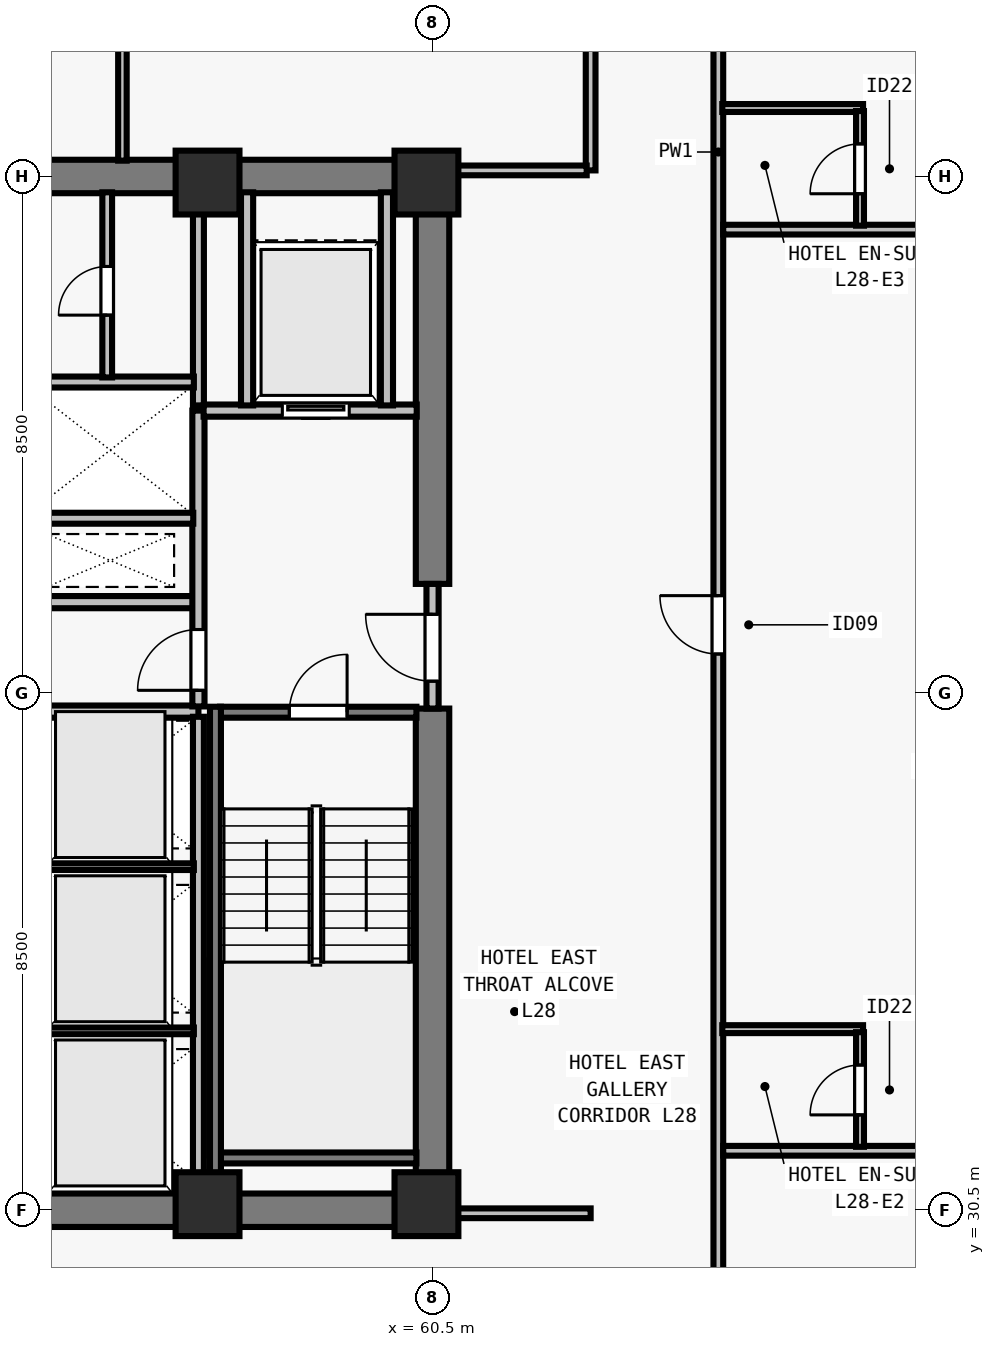
"""IFC4 building model, lengths in metres.
Left out: names, types, materials, properties, quantities, classifications, styles, units other than length and angle.
Written with IfcOpenShell. Run it as: python <this file> out.ifc"""

import sys

from ifc_helpers import new_model, si_unit, direction, frame, frame_2d, origin, origin_2d, place, context, subcontext, project, spatial, rectangle, extrude, element, fill, save


model = new_model("IFC4")
c1 = context("Model", 3, precision=1e-05, world=origin(), true_north=direction((0.0, 1.0)))
c2 = subcontext(c1, "Body", "Model", "MODEL_VIEW")
j1 = project(units=[si_unit("LENGTHUNIT", "METRE"), si_unit("PLANEANGLEUNIT", "RADIAN")], contexts=[c1])
p1 = place(None, origin())
s1 = spatial("IfcSite", under=j1, at=p1, CompositionType="ELEMENT")
p2 = place(p1, origin())
s2 = spatial("IfcBuilding", under=s1, at=p2, CompositionType="ELEMENT")
p3 = place(p2, frame((0.0, 0.0, 106.0)))
s3 = spatial("IfcBuildingStorey", under=s2, at=p3, CompositionType="ELEMENT", Elevation=106.0)
for number, where, z_axis, x_axis in (
    (1, (56.8, 30.6, 0.0), (0.0, 0.0, 1.0), (1.0, 0.0, 0.0)),
    (2, (60.4, 30.6, 0.0), (0.0, 0.0, 1.0), (1.0, 0.0, 0.0)),
    (3, (56.8, 47.4, 0.0), (0.0, 0.0, 1.0), (1.0, 0.0, 0.0)),
    (4, (60.4, 47.4, 0.0), (0.0, 0.0, 1.0), (1.0, 0.0, 0.0)),
):
    element("IfcColumn", number, at=place(p3, frame(where, z_axis=z_axis, x_axis=x_axis)), inside=s3, PredefinedType="COLUMN", context=c2, shape_type="SweptSolid", body=[
        extrude(rectangle(XDim=1.05, YDim=1.05, at=origin_2d()), origin(), (0.0, 0.0, 1.0), 3.5),
    ])
for number, where, z_axis, x_axis in (
    (5, (43.225, 30.5, 0.0), (0.0, 0.0, 1.0), (1.0, 0.0, 0.0)),
    (6, (43.225, 47.5, 0.0), (0.0, 0.0, 1.0), (1.0, 0.0, 0.0)),
):
    element("IfcWall", number, at=place(p3, frame(where, z_axis=z_axis, x_axis=x_axis)), inside=s3, PredefinedType="SHEAR", context=c2, shape_type="SweptSolid", body=[
        extrude(rectangle(XDim=17.55, YDim=0.55, at=frame_2d((8.775, 0.0))), origin(), (0.0, 0.0, 1.0), 3.28),
    ])
p4 = place(p3, frame((60.5, 30.765, 0.0), z_axis=(0.0, 0.0, 1.0), x_axis=(0.0, 1.0, 0.0)))
e7 = element("IfcWall", 7, at=p4, inside=s3, PredefinedType="SHEAR", context=c2, shape_type="SweptSolid", body=[
    extrude(rectangle(XDim=7.985, YDim=0.55, at=frame_2d((3.993, 0.0))), origin(), (0.0, 0.0, 1.0), 3.28),
])
p5 = place(p3, frame((60.5, 40.8, 0.0), z_axis=(0.0, 0.0, 1.0), x_axis=(0.0, 1.0, 0.0)))
e8 = element("IfcWall", 8, at=p5, inside=s3, PredefinedType="SHEAR", context=c2, shape_type="SweptSolid", body=[
    extrude(rectangle(XDim=6.435, YDim=0.55, at=frame_2d((3.218, 0.0))), origin(), (0.0, 0.0, 1.0), 3.28),
])
for number, where, z_axis, x_axis in (
    (9, (53.7, 38.7, 0.0), (0.0, 0.0, 1.0), (1.0, 0.0, 0.0)),
    (10, (53.7, 40.5, 0.0), (0.0, 0.0, 1.0), (1.0, 0.0, 0.0)),
):
    element("IfcWall", number, at=place(p3, frame(where, z_axis=z_axis, x_axis=x_axis)), inside=s3, PredefinedType="SOLIDWALL", context=c2, shape_type="SweptSolid", body=[
        extrude(rectangle(XDim=2.95, YDim=0.2, at=frame_2d((1.475, 0.0))), origin(), (0.0, 0.0, 1.0), 3.28),
    ])
p6 = place(p3, frame((60.5, 38.75, 0.0), z_axis=(0.0, 0.0, 1.0), x_axis=(0.0, 1.0, 0.0)))
e11 = element("IfcWall", 11, at=p6, inside=s3, PredefinedType="SOLIDWALL", context=c2, shape_type="SweptSolid", body=[
    extrude(rectangle(XDim=2.05, YDim=0.2, at=frame_2d((1.025, 0.0))), origin(), (0.0, 0.0, 1.0), 3.28),
])
p7 = place(p6, frame((0.45, 0.0, 0.0)))
e12 = element("IfcOpeningElement", 12, at=p7, cuts=e11, PredefinedType="OPENING", context=c2, shape_type="SweptSolid", body=[
    extrude(rectangle(XDim=1.1, YDim=2.15, at=frame_2d((0.55, 1.075))), frame((0.0, 0.11, 0.0), z_axis=(0.0, -1.0, 0.0), x_axis=(1.0, 0.0, 0.0)), (0.0, 0.0, 1.0), 0.22),
])
p8 = place(p3, frame((56.65, 38.785, 0.0), z_axis=(0.0, 0.0, 1.0), x_axis=(0.0, 1.0, 0.0)))
e13 = element("IfcWall", 13, at=p8, inside=s3, PredefinedType="SOLIDWALL", context=c2, shape_type="SweptSolid", body=[
    extrude(rectangle(XDim=4.865, YDim=0.2, at=frame_2d((2.433, 0.0))), origin(), (0.0, 0.0, 1.0), 3.28),
])
p9 = place(p8, frame((0.265, 0.0, 0.0)))
e14 = element("IfcOpeningElement", 14, at=p9, cuts=e13, PredefinedType="OPENING", context=c2, shape_type="SweptSolid", body=[
    extrude(rectangle(XDim=1.0, YDim=2.15, at=frame_2d((0.5, 1.075))), frame((0.0, 0.11, 0.0), z_axis=(0.0, -1.0, 0.0), x_axis=(1.0, 0.0, 0.0)), (0.0, 0.0, 1.0), 0.22),
])
p10 = place(p3, frame((56.735, 43.65, 0.0), z_axis=(0.0, 0.0, 1.0), x_axis=(1.0, 0.0, 0.0)))
e15 = element("IfcWall", 15, at=p10, inside=s3, PredefinedType="SOLIDWALL", context=c2, shape_type="SweptSolid", body=[
    extrude(rectangle(XDim=3.505, YDim=0.2, at=frame_2d((1.752, 0.0))), origin(), (0.0, 0.0, 1.0), 3.28),
])
p11 = place(p10, frame((1.295, 0.0, 0.0)))
e16 = element("IfcOpeningElement", 16, at=p11, cuts=e15, PredefinedType="OPENING", context=c2, shape_type="SweptSolid", body=[
    extrude(rectangle(XDim=1.1, YDim=2.2, at=frame_2d((0.55, 1.1))), frame((0.0, 0.11, 0.0), z_axis=(0.0, -1.0, 0.0), x_axis=(1.0, 0.0, 0.0)), (0.0, 0.0, 1.0), 0.22),
])
for number, where, z_axis, x_axis in (
    (17, (57.45, 43.735, 0.0), (0.0, 0.0, 1.0), (0.0, 1.0, 0.0)),
    (18, (59.75, 43.735, 0.0), (0.0, 0.0, 1.0), (0.0, 1.0, 0.0)),
):
    element("IfcWall", number, at=place(p3, frame(where, z_axis=z_axis, x_axis=x_axis)), inside=s3, PredefinedType="SOLIDWALL", context=c2, shape_type="SweptSolid", body=[
        extrude(rectangle(XDim=3.505, YDim=0.2, at=frame_2d((1.752, 0.0))), origin(), (0.0, 0.0, 1.0), 3.28),
    ])
p12 = place(p3, frame((56.65, 30.76, 0.0), z_axis=(0.0, 0.0, 1.0), x_axis=(0.0, 1.0, 0.0)))
e19 = element("IfcWall", 19, at=p12, inside=s3, PredefinedType="SOLIDWALL", context=c2, shape_type="SweptSolid", body=[
    extrude(rectangle(XDim=7.855, YDim=0.18, at=frame_2d((3.927, 0.0))), origin(), (0.0, 0.0, 1.0), 3.28),
])
for number, where, z_axis, x_axis in (
    (20, (53.785, 33.45, 0.0), (0.0, 0.0, 1.0), (1.0, 0.0, 0.0)),
    (21, (53.785, 36.15, 0.0), (0.0, 0.0, 1.0), (1.0, 0.0, 0.0)),
):
    element("IfcWall", number, at=place(p3, frame(where, z_axis=z_axis, x_axis=x_axis)), inside=s3, PredefinedType="PARTITIONING", context=c2, shape_type="SweptSolid", body=[
        extrude(rectangle(XDim=2.79, YDim=0.11, at=frame_2d((1.395, 0.0))), origin(), (0.0, 0.0, 1.0), 3.28),
    ])
p13 = place(p3, frame((56.65, 43.735, 0.0), z_axis=(0.0, 0.0, 1.0), x_axis=(0.0, 1.0, 0.0)))
e22 = element("IfcWall", 22, at=p13, inside=s3, PredefinedType="SOLIDWALL", context=c2, shape_type="SweptSolid", body=[
    extrude(rectangle(XDim=3.505, YDim=0.18, at=frame_2d((1.752, 0.0))), origin(), (0.0, 0.0, 1.0), 3.28),
])
p14 = place(p3, frame((53.785, 41.88, 0.0), z_axis=(0.0, 0.0, 1.0), x_axis=(1.0, 0.0, 0.0)))
e23 = element("IfcWall", 23, at=p14, inside=s3, PredefinedType="SOLIDWALL", context=c2, shape_type="SweptSolid", body=[
    extrude(rectangle(XDim=2.78, YDim=0.18, at=frame_2d((1.39, 0.0))), origin(), (0.0, 0.0, 1.0), 3.28),
])
p15 = place(p3, frame((53.785, 44.12, 0.0), z_axis=(0.0, 0.0, 1.0), x_axis=(1.0, 0.0, 0.0)))
e24 = element("IfcWall", 24, at=p15, inside=s3, PredefinedType="SOLIDWALL", context=c2, shape_type="SweptSolid", body=[
    extrude(rectangle(XDim=2.79, YDim=0.18, at=frame_2d((1.395, 0.0))), origin(), (0.0, 0.0, 1.0), 3.28),
])
p16 = place(p3, frame((55.15, 44.195, 0.0), z_axis=(0.0, 0.0, 1.0), x_axis=(0.0, 1.0, 0.0)))
e25 = element("IfcWall", 25, at=p16, inside=s3, PredefinedType="PARTITIONING", context=c2, shape_type="SweptSolid", body=[
    extrude(rectangle(XDim=3.045, YDim=0.16, at=frame_2d((1.522, 0.0))), origin(), (0.0, 0.0, 1.0), 3.28),
])
p17 = place(p16, frame((1.025, 0.0, 0.0)))
e26 = element("IfcOpeningElement", 26, at=p17, cuts=e25, PredefinedType="OPENING", context=c2, shape_type="SweptSolid", body=[
    extrude(rectangle(XDim=0.8, YDim=2.1, at=frame_2d((0.4, 1.05))), frame((0.0, 0.09, 0.0), z_axis=(0.0, -1.0, 0.0), x_axis=(1.0, 0.0, 0.0)), (0.0, 0.0, 1.0), 0.18),
])
p18 = place(p3, frame((65.2, 15.325, 0.0), z_axis=(0.0, 0.0, 1.0), x_axis=(0.0, 1.0, 0.0)))
e27 = element("IfcWall", 27, at=p18, inside=s3, PredefinedType="PARTITIONING", context=c2, shape_type="SweptSolid", body=[
    extrude(rectangle(XDim=47.35, YDim=0.16, at=frame_2d((23.675, 0.0))), origin(), (0.0, 0.0, 1.0), 2.555),
])
p19 = place(p18, frame((8.944, 0.0, 0.0)))
e28 = element("IfcOpeningElement", 28, at=p19, cuts=e27, PredefinedType="OPENING", context=c2, shape_type="SweptSolid", body=[
    extrude(rectangle(XDim=0.96, YDim=2.15, at=frame_2d((0.48, 1.075))), frame((0.0, 0.09, 0.0), z_axis=(0.0, -1.0, 0.0), x_axis=(1.0, 0.0, 0.0)), (0.0, 0.0, 1.0), 0.18),
])
p20 = place(p18, frame((24.322, 0.0, 0.0)))
e29 = element("IfcOpeningElement", 29, at=p20, cuts=e27, PredefinedType="OPENING", context=c2, shape_type="SweptSolid", body=[
    extrude(rectangle(XDim=0.96, YDim=2.15, at=frame_2d((0.48, 1.075))), frame((0.0, 0.09, 0.0), z_axis=(0.0, -1.0, 0.0), x_axis=(1.0, 0.0, 0.0)), (0.0, 0.0, 1.0), 0.18),
])
p21 = place(p18, frame((39.873, 0.0, 0.0)))
e30 = element("IfcOpeningElement", 30, at=p21, cuts=e27, PredefinedType="OPENING", context=c2, shape_type="SweptSolid", body=[
    extrude(rectangle(XDim=0.96, YDim=2.15, at=frame_2d((0.48, 1.075))), frame((0.0, 0.09, 0.0), z_axis=(0.0, -1.0, 0.0), x_axis=(1.0, 0.0, 0.0)), (0.0, 0.0, 1.0), 0.18),
])
p22 = place(p3, frame((63.1, 47.6, 0.0), z_axis=(0.0, 0.0, 1.0), x_axis=(0.0, 1.0, 0.0)))
e31 = element("IfcWall", 31, at=p22, inside=s3, PredefinedType="PARTITIONING", context=c2, shape_type="SweptSolid", body=[
    extrude(rectangle(XDim=15.075, YDim=0.16, at=frame_2d((7.538, 0.0))), origin(), (0.0, 0.0, 1.0), 2.555),
])
p23 = place(p22, frame((3.5, 0.0, 0.0)))
e32 = element("IfcOpeningElement", 32, at=p23, cuts=e31, PredefinedType="OPENING", context=c2, shape_type="SweptSolid", body=[
    extrude(rectangle(XDim=0.96, YDim=2.12, at=frame_2d((0.48, 1.06))), frame((0.0, 0.09, 0.0), z_axis=(0.0, -1.0, 0.0), x_axis=(1.0, 0.0, 0.0)), (0.0, 0.0, 1.0), 0.18),
])
p24 = place(p3, frame((60.765, 30.45, 0.0), z_axis=(0.0, 0.0, 1.0), x_axis=(1.0, 0.0, 0.0)))
e33 = element("IfcWall", 33, at=p24, inside=s3, PredefinedType="PARTITIONING", context=c2, shape_type="SweptSolid", body=[
    extrude(rectangle(XDim=2.335, YDim=0.16, at=frame_2d((1.167, 0.0))), origin(), (0.0, 0.0, 1.0), 3.28),
])
p25 = place(p3, frame((60.765, 47.6, 0.0), z_axis=(0.0, 0.0, 1.0), x_axis=(1.0, 0.0, 0.0)))
e34 = element("IfcWall", 34, at=p25, inside=s3, PredefinedType="PARTITIONING", context=c2, shape_type="SweptSolid", body=[
    extrude(rectangle(XDim=2.27, YDim=0.16, at=frame_2d((1.135, 0.0))), origin(), (0.0, 0.0, 1.0), 3.28),
])
p26 = place(p3, frame((55.4, 47.76, 0.0), z_axis=(0.0, 0.0, 1.0), x_axis=(0.0, 1.0, 0.0)))
e35 = element("IfcWall", 35, at=p26, inside=s3, PredefinedType="PARTITIONING", context=c2, shape_type="SweptSolid", body=[
    extrude(rectangle(XDim=14.915, YDim=0.14, at=frame_2d((7.458, 0.0))), origin(), (0.0, 0.0, 1.0), 2.896),
])
p27 = place(p3, frame((65.28, 31.478, 0.0), z_axis=(0.0, 0.0, 1.0), x_axis=(1.0, 0.0, 0.0)))
e36 = element("IfcWall", 36, at=p27, inside=s3, PredefinedType="PARTITIONING", context=c2, shape_type="SweptSolid", body=[
    extrude(rectangle(XDim=10.395, YDim=0.16, at=frame_2d((5.198, 0.0))), origin(), (0.0, 0.0, 1.0), 3.28),
])
p28 = place(p3, frame((65.265, 33.478, 0.0), z_axis=(0.0, 0.0, 1.0), x_axis=(1.0, 0.0, 0.0)))
e37 = element("IfcWall", 37, at=p28, inside=s3, PredefinedType="PLUMBINGWALL", context=c2, shape_type="SweptSolid", body=[
    extrude(rectangle(XDim=2.315, YDim=0.13, at=frame_2d((1.158, 0.0))), origin(), (0.0, 0.0, 1.0), 3.28),
])
p29 = place(p3, frame((67.53, 31.543, 0.0), z_axis=(0.0, 0.0, 1.0), x_axis=(0.0, 1.0, 0.0)))
e38 = element("IfcWall", 38, at=p29, inside=s3, PredefinedType="PLUMBINGWALL", context=c2, shape_type="SweptSolid", body=[
    extrude(rectangle(XDim=1.885, YDim=0.13, at=frame_2d((0.942, 0.0))), origin(), (0.0, 0.0, 1.0), 3.28),
])
p30 = place(p29, frame((0.525, 0.0, 0.0)))
e39 = element("IfcOpeningElement", 39, at=p30, cuts=e38, PredefinedType="OPENING", context=c2, shape_type="SweptSolid", body=[
    extrude(rectangle(XDim=0.82, YDim=2.1, at=frame_2d((0.41, 1.05))), frame((0.0, 0.075, 0.0), z_axis=(0.0, -1.0, 0.0), x_axis=(1.0, 0.0, 0.0)), (0.0, 0.0, 1.0), 0.15),
])
p31 = place(p3, frame((65.28, 46.626, 0.0), z_axis=(0.0, 0.0, 1.0), x_axis=(1.0, 0.0, 0.0)))
e40 = element("IfcWall", 40, at=p31, inside=s3, PredefinedType="PARTITIONING", context=c2, shape_type="SweptSolid", body=[
    extrude(rectangle(XDim=10.395, YDim=0.16, at=frame_2d((5.198, 0.0))), origin(), (0.0, 0.0, 1.0), 3.28),
])
p32 = place(p3, frame((65.265, 48.626, 0.0), z_axis=(0.0, 0.0, 1.0), x_axis=(1.0, 0.0, 0.0)))
e41 = element("IfcWall", 41, at=p32, inside=s3, PredefinedType="PLUMBINGWALL", context=c2, shape_type="SweptSolid", body=[
    extrude(rectangle(XDim=2.315, YDim=0.13, at=frame_2d((1.158, 0.0))), origin(), (0.0, 0.0, 1.0), 3.28),
])
p33 = place(p3, frame((67.53, 46.691, 0.0), z_axis=(0.0, 0.0, 1.0), x_axis=(0.0, 1.0, 0.0)))
e42 = element("IfcWall", 42, at=p33, inside=s3, PredefinedType="PLUMBINGWALL", context=c2, shape_type="SweptSolid", body=[
    extrude(rectangle(XDim=1.885, YDim=0.13, at=frame_2d((0.942, 0.0))), origin(), (0.0, 0.0, 1.0), 3.28),
])
p34 = place(p33, frame((0.525, 0.0, 0.0)))
e43 = element("IfcOpeningElement", 43, at=p34, cuts=e42, PredefinedType="OPENING", context=c2, shape_type="SweptSolid", body=[
    extrude(rectangle(XDim=0.82, YDim=2.1, at=frame_2d((0.41, 1.05))), frame((0.0, 0.075, 0.0), z_axis=(0.0, -1.0, 0.0), x_axis=(1.0, 0.0, 0.0)), (0.0, 0.0, 1.0), 0.15),
])
p35 = place(p3, frame((57.005, 38.69, 0.0), z_axis=(0.0, 0.0, 1.0), x_axis=(1.0, 0.0, 0.0)))
e44 = element("IfcWall", 44, at=p35, inside=s3, PredefinedType="SOLIDWALL", context=c2, shape_type="SweptSolid", body=[
    extrude(rectangle(XDim=3.23, YDim=0.18, at=frame_2d((1.615, 0.0))), origin(), (0.0, 0.0, 1.0), 3.28),
])
p36 = place(p35, frame((1.14, 0.0, 0.0)))
e45 = element("IfcOpeningElement", 45, at=p36, cuts=e44, PredefinedType="OPENING", context=c2, shape_type="SweptSolid", body=[
    extrude(rectangle(XDim=0.95, YDim=2.15, at=frame_2d((0.475, 1.075))), frame((0.0, 0.1, 0.0), z_axis=(0.0, -1.0, 0.0), x_axis=(1.0, 0.0, 0.0)), (0.0, 0.0, 1.0), 0.2),
])
p37 = place(p3, frame((57.005, 31.36, 0.0), z_axis=(0.0, 0.0, 1.0), x_axis=(1.0, 0.0, 0.0)))
e46 = element("IfcWall", 46, at=p37, inside=s3, PredefinedType="SOLIDWALL", context=c2, shape_type="SweptSolid", body=[
    extrude(rectangle(XDim=3.23, YDim=0.18, at=frame_2d((1.615, 0.0))), origin(), (0.0, 0.0, 1.0), 3.28),
])
p38 = place(p3, frame((56.93, 38.78, 0.0), z_axis=(0.0, 0.0, 1.0), x_axis=(0.0, -1.0, 0.0)))
e47 = element("IfcWall", 47, at=p38, inside=s3, PredefinedType="SOLIDWALL", context=c2, shape_type="SweptSolid", body=[
    extrude(rectangle(XDim=8.017, YDim=0.18, at=frame_2d((4.009, 0.0))), origin(), (0.0, 0.0, 1.0), 3.28),
])
p39 = place(p7, origin())
e48 = element("IfcDoor", 48, at=p39, inside=s3, OperationType="SINGLE_SWING_RIGHT", PredefinedType="DOOR", context=c2, shape_type="SweptSolid", body=[
    extrude(rectangle(XDim=1.1, YDim=2.15, at=frame_2d((0.55, 1.075))), frame((0.0, 0.025, 0.0), z_axis=(0.0, -1.0, 0.0), x_axis=(1.0, 0.0, 0.0)), (0.0, 0.0, 1.0), 0.05),
])
fill(e12, e48)
p40 = place(p9, origin())
e49 = element("IfcDoor", 49, at=p40, inside=s3, OperationType="SINGLE_SWING_LEFT", PredefinedType="DOOR", context=c2, shape_type="SweptSolid", body=[
    extrude(rectangle(XDim=1.0, YDim=2.15, at=frame_2d((0.5, 1.075))), frame((0.0, 0.025, 0.0), z_axis=(0.0, -1.0, 0.0), x_axis=(1.0, 0.0, 0.0)), (0.0, 0.0, 1.0), 0.05),
])
fill(e14, e49)
p41 = place(p11, origin())
e50 = element("IfcDoor", 50, at=p41, inside=s3, OperationType="SLIDING_TO_LEFT", PredefinedType="DOOR", context=c2, shape_type="SweptSolid", body=[
    extrude(rectangle(XDim=1.1, YDim=2.2, at=frame_2d((0.55, 1.1))), frame((0.0, 0.025, 0.0), z_axis=(0.0, -1.0, 0.0), x_axis=(1.0, 0.0, 0.0)), (0.0, 0.0, 1.0), 0.05),
])
fill(e16, e50)
p42 = place(p17, origin())
e51 = element("IfcDoor", 51, at=p42, inside=s3, OperationType="SINGLE_SWING_LEFT", PredefinedType="DOOR", context=c2, shape_type="SweptSolid", body=[
    extrude(rectangle(XDim=0.8, YDim=2.1, at=frame_2d((0.4, 1.05))), frame((0.0, 0.025, 0.0), z_axis=(0.0, -1.0, 0.0), x_axis=(1.0, 0.0, 0.0)), (0.0, 0.0, 1.0), 0.05),
])
fill(e26, e51)
p43 = place(p30, origin())
e52 = element("IfcDoor", 52, at=p43, inside=s3, OperationType="SINGLE_SWING_LEFT", PredefinedType="DOOR", context=c2, shape_type="SweptSolid", body=[
    extrude(rectangle(XDim=0.82, YDim=2.1, at=frame_2d((0.41, 1.05))), frame((0.0, 0.025, 0.0), z_axis=(0.0, -1.0, 0.0), x_axis=(1.0, 0.0, 0.0)), (0.0, 0.0, 1.0), 0.05),
])
fill(e39, e52)
p44 = place(p20, origin())
e53 = element("IfcDoor", 53, at=p44, inside=s3, OperationType="SINGLE_SWING_RIGHT", PredefinedType="DOOR", context=c2, shape_type="SweptSolid", body=[
    extrude(rectangle(XDim=0.96, YDim=2.15, at=frame_2d((0.48, 1.075))), frame((0.0, 0.025, 0.0), z_axis=(0.0, -1.0, 0.0), x_axis=(1.0, 0.0, 0.0)), (0.0, 0.0, 1.0), 0.05),
])
fill(e29, e53)
p45 = place(p34, origin())
e54 = element("IfcDoor", 54, at=p45, inside=s3, OperationType="SINGLE_SWING_LEFT", PredefinedType="DOOR", context=c2, shape_type="SweptSolid", body=[
    extrude(rectangle(XDim=0.82, YDim=2.1, at=frame_2d((0.41, 1.05))), frame((0.0, 0.025, 0.0), z_axis=(0.0, -1.0, 0.0), x_axis=(1.0, 0.0, 0.0)), (0.0, 0.0, 1.0), 0.05),
])
fill(e43, e54)
p46 = place(p36, origin())
e55 = element("IfcDoor", 55, at=p46, inside=s3, OperationType="SINGLE_SWING_RIGHT", PredefinedType="DOOR", context=c2, shape_type="SweptSolid", body=[
    extrude(rectangle(XDim=0.95, YDim=2.15, at=frame_2d((0.475, 1.075))), frame((0.0, 0.025, 0.0), z_axis=(0.0, -1.0, 0.0), x_axis=(1.0, 0.0, 0.0)), (0.0, 0.0, 1.0), 0.05),
])
fill(e45, e55)
save(model, sys.argv[1])
